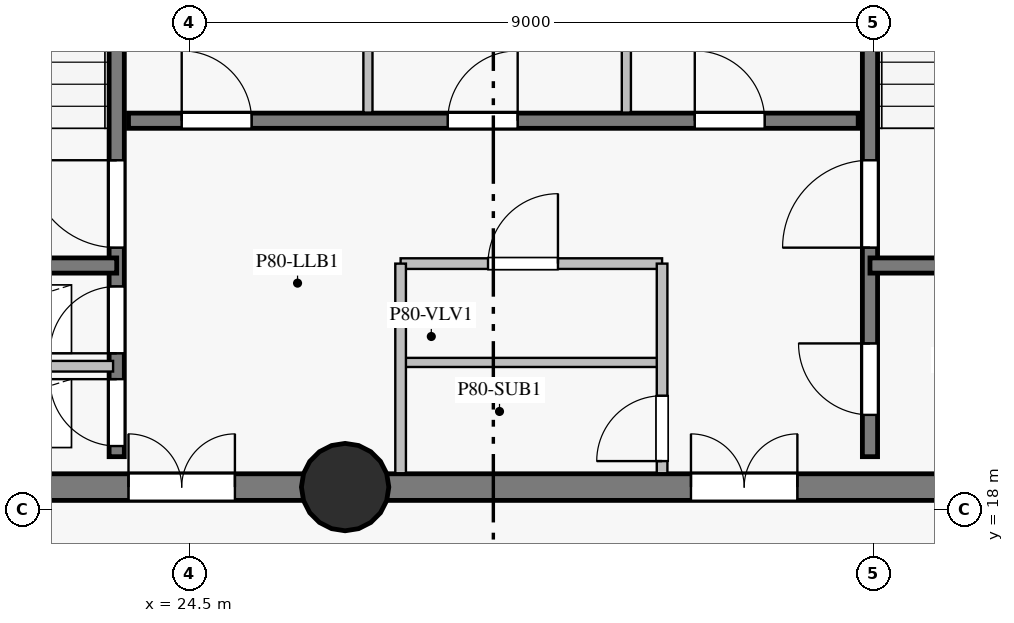
"""IFC4 building model, lengths in metres.
Left out: names, types, materials, properties, quantities, classifications, styles, units other than length and angle.
Written with IfcOpenShell. Run it as: python <this file> out.ifc"""

import sys

from ifc_helpers import new_model, si_unit, direction, frame, frame_2d, origin, origin_with_axes, origin_2d, place, context, subcontext, project, spatial, rectangle, circle, extrude, source, transform, mapped, element, fill, save


model = new_model("IFC4")
c1 = context("Model", 3, precision=1e-05, world=origin(), true_north=direction((0.0, 1.0)))
c2 = subcontext(c1, "Body", "Model", "MODEL_VIEW")
j1 = project(units=[si_unit("LENGTHUNIT", "METRE"), si_unit("PLANEANGLEUNIT", "RADIAN")], contexts=[c1])
p1 = place(None, origin())
s1 = spatial("IfcSite", under=j1, at=p1, CompositionType="ELEMENT")
p2 = place(p1, origin())
s2 = spatial("IfcBuilding", under=s1, at=p2, CompositionType="ELEMENT")
p3 = place(p2, frame((0.0, 0.0, 268.75)))
s3 = spatial("IfcBuildingStorey", under=s2, at=p3, CompositionType="ELEMENT", Elevation=268.75)
p4 = place(p3, frame((19.5, 18.3, 0.0), z_axis=(0.0, 0.0, 1.0), x_axis=(1.0, 0.0, 0.0)))
e1 = element("IfcWall", 1, at=p4, inside=s3, PredefinedType="SHEAR", context=c2, shape_type="SweptSolid", body=[
    extrude(rectangle(XDim=7.05, YDim=0.35, at=frame_2d((3.525, 0.0))), origin(), (0.0, 0.0, 1.0), 4.375),
])
p5 = place(p4, frame((4.2, 0.0, 0.0)))
e2 = element("IfcOpeningElement", 2, at=p5, cuts=e1, PredefinedType="OPENING", context=c2, shape_type="SweptSolid", body=[
    extrude(rectangle(XDim=1.4, YDim=2.2, at=frame_2d((0.7, 1.1))), frame((0.0, 0.185, 0.0), z_axis=(0.0, -1.0, 0.0), x_axis=(1.0, 0.0, 0.0)), (0.0, 0.0, 1.0), 0.37),
])
p6 = place(p3, frame((26.55, 18.3, 0.0), z_axis=(0.0, 0.0, 1.0), x_axis=(1.0, 0.0, 0.0)))
e3 = element("IfcWall", 3, at=p6, inside=s3, PredefinedType="SHEAR", context=c2, shape_type="SweptSolid", body=[
    extrude(rectangle(XDim=10.95, YDim=0.35, at=frame_2d((5.475, 0.0))), origin(), (0.0, 0.0, 1.0), 4.375),
])
p7 = place(p6, frame((4.55, 0.0, 0.0)))
e4 = element("IfcOpeningElement", 4, at=p7, cuts=e3, PredefinedType="OPENING", context=c2, shape_type="SweptSolid", body=[
    extrude(rectangle(XDim=1.4, YDim=2.2, at=frame_2d((0.7, 1.1))), frame((0.0, 0.185, 0.0), z_axis=(0.0, -1.0, 0.0), x_axis=(1.0, 0.0, 0.0)), (0.0, 0.0, 1.0), 0.37),
])
m1 = source(origin_with_axes(), c2, "Body", "SweptSolid", [
    extrude(circle(Radius=0.575, at=origin_2d()), origin(), (0.0, 0.0, 1.0), 4.65),
])
p8 = place(p3, frame((26.55, 18.3, 0.0), z_axis=(0.0, 0.0, 1.0), x_axis=(1.0, 0.0, 0.0)))
e5 = element("IfcColumn", 5, at=p8, inside=s3, PredefinedType="COLUMN", context=c2, shape_type="MappedRepresentation", body=[
    mapped(m1, transform((0.0, 0.0, 0.0), scale=1.0)),
])
p9 = place(p3, frame((23.545, 18.7, 0.0), z_axis=(0.0, 0.0, 1.0), x_axis=(0.0, 1.0, 0.0)))
e6 = element("IfcWall", 6, at=p9, inside=s3, PredefinedType="SHEAR", context=c2, shape_type="SweptSolid", body=[
    extrude(rectangle(XDim=15.6, YDim=0.2, at=frame_2d((7.8, 0.0))), origin(), (0.0, 0.0, 1.0), 4.375),
])
p10 = place(p9, frame((2.75, 0.0, 0.0)))
e7 = element("IfcOpeningElement", 7, at=p10, cuts=e6, PredefinedType="OPENING", context=c2, shape_type="SweptSolid", body=[
    extrude(rectangle(XDim=1.15, YDim=2.15, at=frame_2d((0.575, 1.075))), frame((0.0, 0.11, 0.0), z_axis=(0.0, -1.0, 0.0), x_axis=(1.0, 0.0, 0.0)), (0.0, 0.0, 1.0), 0.22),
])
p11 = place(p9, frame((0.14, 0.0, 0.0)))
e8 = element("IfcOpeningElement", 8, at=p11, cuts=e6, PredefinedType="OPENING", context=c2, shape_type="SweptSolid", body=[
    extrude(rectangle(XDim=0.88, YDim=2.1, at=frame_2d((0.44, 1.05))), frame((0.0, 0.11, 0.0), z_axis=(0.0, -1.0, 0.0), x_axis=(1.0, 0.0, 0.0)), (0.0, 0.0, 1.0), 0.22),
])
p12 = place(p9, frame((1.36, 0.0, 0.0)))
e9 = element("IfcOpeningElement", 9, at=p12, cuts=e6, PredefinedType="OPENING", context=c2, shape_type="SweptSolid", body=[
    extrude(rectangle(XDim=0.88, YDim=2.1, at=frame_2d((0.44, 1.05))), frame((0.0, 0.11, 0.0), z_axis=(0.0, -1.0, 0.0), x_axis=(1.0, 0.0, 0.0)), (0.0, 0.0, 1.0), 0.22),
])
p13 = place(p9, frame((12.1, 0.0, 0.0)))
e10 = element("IfcOpeningElement", 10, at=p13, cuts=e6, PredefinedType="OPENING", context=c2, shape_type="SweptSolid", body=[
    extrude(rectangle(XDim=1.12, YDim=2.15, at=frame_2d((0.56, 1.075))), frame((0.0, 0.11, 0.0), z_axis=(0.0, -1.0, 0.0), x_axis=(1.0, 0.0, 0.0)), (0.0, 0.0, 1.0), 0.22),
])
p14 = place(p9, frame((14.05, 0.0, 0.0)))
e11 = element("IfcOpeningElement", 11, at=p14, cuts=e6, PredefinedType="OPENING", context=c2, shape_type="SweptSolid", body=[
    extrude(rectangle(XDim=1.12, YDim=2.15, at=frame_2d((0.56, 1.075))), frame((0.0, 0.11, 0.0), z_axis=(0.0, -1.0, 0.0), x_axis=(1.0, 0.0, 0.0)), (0.0, 0.0, 1.0), 0.22),
])
p15 = place(p3, frame((33.455, 18.7, 0.0), z_axis=(0.0, 0.0, 1.0), x_axis=(0.0, 1.0, 0.0)))
e12 = element("IfcWall", 12, at=p15, inside=s3, PredefinedType="SHEAR", context=c2, shape_type="SweptSolid", body=[
    extrude(rectangle(XDim=15.6, YDim=0.2, at=frame_2d((7.8, 0.0))), origin(), (0.0, 0.0, 1.0), 4.375),
])
p16 = place(p15, frame((2.75, 0.0, 0.0)))
e13 = element("IfcOpeningElement", 13, at=p16, cuts=e12, PredefinedType="OPENING", context=c2, shape_type="SweptSolid", body=[
    extrude(rectangle(XDim=1.15, YDim=2.15, at=frame_2d((0.575, 1.075))), frame((0.0, 0.11, 0.0), z_axis=(0.0, -1.0, 0.0), x_axis=(1.0, 0.0, 0.0)), (0.0, 0.0, 1.0), 0.22),
])
p17 = place(p15, frame((0.55, 0.0, 0.0)))
e14 = element("IfcOpeningElement", 14, at=p17, cuts=e12, PredefinedType="OPENING", context=c2, shape_type="SweptSolid", body=[
    extrude(rectangle(XDim=0.94, YDim=2.1, at=frame_2d((0.47, 1.05))), frame((0.0, 0.11, 0.0), z_axis=(0.0, -1.0, 0.0), x_axis=(1.0, 0.0, 0.0)), (0.0, 0.0, 1.0), 0.22),
])
p18 = place(p3, frame((23.7, 23.12, 0.0), z_axis=(0.0, 0.0, 1.0), x_axis=(1.0, 0.0, 0.0)))
e15 = element("IfcWall", 15, at=p18, inside=s3, PredefinedType="SHEAR", context=c2, shape_type="SweptSolid", body=[
    extrude(rectangle(XDim=9.6, YDim=0.2, at=frame_2d((4.8, 0.0))), origin(), (0.0, 0.0, 1.0), 4.375),
])
p19 = place(p18, frame((0.7, 0.0, 0.0)))
e16 = element("IfcOpeningElement", 16, at=p19, cuts=e15, PredefinedType="OPENING", context=c2, shape_type="SweptSolid", body=[
    extrude(rectangle(XDim=0.92, YDim=2.1, at=frame_2d((0.46, 1.05))), frame((0.0, 0.11, 0.0), z_axis=(0.0, -1.0, 0.0), x_axis=(1.0, 0.0, 0.0)), (0.0, 0.0, 1.0), 0.22),
])
p20 = place(p18, frame((4.2, 0.0, 0.0)))
e17 = element("IfcOpeningElement", 17, at=p20, cuts=e15, PredefinedType="OPENING", context=c2, shape_type="SweptSolid", body=[
    extrude(rectangle(XDim=0.92, YDim=2.1, at=frame_2d((0.46, 1.05))), frame((0.0, 0.11, 0.0), z_axis=(0.0, -1.0, 0.0), x_axis=(1.0, 0.0, 0.0)), (0.0, 0.0, 1.0), 0.22),
])
p21 = place(p18, frame((7.45, 0.0, 0.0)))
e18 = element("IfcOpeningElement", 18, at=p21, cuts=e15, PredefinedType="OPENING", context=c2, shape_type="SweptSolid", body=[
    extrude(rectangle(XDim=0.92, YDim=2.1, at=frame_2d((0.46, 1.05))), frame((0.0, 0.11, 0.0), z_axis=(0.0, -1.0, 0.0), x_axis=(1.0, 0.0, 0.0)), (0.0, 0.0, 1.0), 0.22),
])
for number, where, z_axis, x_axis in (
    (19, (33.455, 21.215, 0.0), (0.0, 0.0, 1.0), (1.0, 0.0, 0.0)),
    (20, (19.55, 21.215, 0.0), (0.0, 0.0, 1.0), (1.0, 0.0, 0.0)),
):
    element("IfcWall", number, at=place(p3, frame(where, z_axis=z_axis, x_axis=x_axis)), inside=s3, PredefinedType="SHEAR", context=c2, shape_type="SweptSolid", body=[
        extrude(rectangle(XDim=3.995, YDim=0.2, at=frame_2d((1.998, 0.0))), origin(), (0.0, 0.0, 1.0), 4.375),
    ])
p22 = place(p3, frame((19.682, 19.89, 0.0), z_axis=(0.0, 0.0, 1.0), x_axis=(1.0, 0.0, 0.0)))
e21 = element("IfcWall", 21, at=p22, inside=s3, PredefinedType="PARTITIONING", context=c2, shape_type="SweptSolid", body=[
    extrude(rectangle(XDim=3.815, YDim=0.14, at=frame_2d((1.908, 0.0))), origin(), (0.0, 0.0, 1.0), 4.375),
])
p23 = place(p3, frame((27.28, 21.24, 0.0), z_axis=(0.0, 0.0, 1.0), x_axis=(1.0, 0.0, 0.0)))
e22 = element("IfcWall", 22, at=p23, inside=s3, PredefinedType="PARTITIONING", context=c2, shape_type="SweptSolid", body=[
    extrude(rectangle(XDim=3.44, YDim=0.14, at=frame_2d((1.72, 0.0))), origin(), (0.0, 0.0, 1.0), 4.375),
])
p24 = place(p23, frame((1.15, 0.0, 0.0)))
e23 = element("IfcOpeningElement", 23, at=p24, cuts=e22, PredefinedType="OPENING", context=c2, shape_type="SweptSolid", body=[
    extrude(rectangle(XDim=0.92, YDim=2.1, at=frame_2d((0.46, 1.05))), frame((0.0, 0.08, 0.0), z_axis=(0.0, -1.0, 0.0), x_axis=(1.0, 0.0, 0.0)), (0.0, 0.0, 1.0), 0.16),
])
p25 = place(p3, frame((27.28, 19.94, 0.0), z_axis=(0.0, 0.0, 1.0), x_axis=(1.0, 0.0, 0.0)))
e24 = element("IfcWall", 24, at=p25, inside=s3, PredefinedType="PARTITIONING", context=c2, shape_type="SweptSolid", body=[
    extrude(rectangle(XDim=3.44, YDim=0.12, at=frame_2d((1.72, 0.0))), origin(), (0.0, 0.0, 1.0), 4.375),
])
p26 = place(p3, frame((27.28, 18.482, 0.0), z_axis=(0.0, 0.0, 1.0), x_axis=(0.0, 1.0, 0.0)))
e25 = element("IfcWall", 25, at=p26, inside=s3, PredefinedType="PARTITIONING", context=c2, shape_type="SweptSolid", body=[
    extrude(rectangle(XDim=2.758, YDim=0.14, at=frame_2d((1.379, 0.0))), origin(), (0.0, 0.0, 1.0), 4.375),
])
p27 = place(p3, frame((30.72, 18.482, 0.0), z_axis=(0.0, 0.0, 1.0), x_axis=(0.0, 1.0, 0.0)))
e26 = element("IfcWall", 26, at=p27, inside=s3, PredefinedType="PARTITIONING", context=c2, shape_type="SweptSolid", body=[
    extrude(rectangle(XDim=2.758, YDim=0.14, at=frame_2d((1.379, 0.0))), origin(), (0.0, 0.0, 1.0), 4.375),
])
p28 = place(p27, frame((0.16, 0.0, 0.0)))
e27 = element("IfcOpeningElement", 27, at=p28, cuts=e26, PredefinedType="OPENING", context=c2, shape_type="SweptSolid", body=[
    extrude(rectangle(XDim=0.86, YDim=2.1, at=frame_2d((0.43, 1.05))), frame((0.0, 0.08, 0.0), z_axis=(0.0, -1.0, 0.0), x_axis=(1.0, 0.0, 0.0)), (0.0, 0.0, 1.0), 0.16),
])
for number, where, z_axis, x_axis in (
    (28, (26.85, 23.227, 0.0), (0.0, 0.0, 1.0), (0.0, 1.0, 0.0)),
    (29, (30.25, 23.227, 0.0), (0.0, 0.0, 1.0), (0.0, 1.0, 0.0)),
):
    element("IfcWall", number, at=place(p3, frame(where, z_axis=z_axis, x_axis=x_axis)), inside=s3, PredefinedType="PARTITIONING", context=c2, shape_type="SweptSolid", body=[
        extrude(rectangle(XDim=2.587, YDim=0.12, at=frame_2d((1.293, 0.0))), origin(), (0.0, 0.0, 1.0), 4.375),
    ])
m2 = source(origin_with_axes(), c2, "Body", "SweptSolid", [
    extrude(rectangle(XDim=1.15, YDim=2.15, at=frame_2d((0.575, 1.075))), frame((0.0, 0.025, 0.0), z_axis=(0.0, -1.0, 0.0), x_axis=(1.0, 0.0, 0.0)), (0.0, 0.0, 1.0), 0.05),
])
p29 = place(p10, origin())
e30 = element("IfcDoor", 30, at=p29, inside=s3, OperationType="SINGLE_SWING_RIGHT", PredefinedType="DOOR", context=c2, shape_type="MappedRepresentation", body=[
    mapped(m2, transform((0.0, 0.0, 0.0), scale=1.0)),
])
fill(e7, e30)
p30 = place(p16, origin())
e31 = element("IfcDoor", 31, at=p30, inside=s3, OperationType="SINGLE_SWING_LEFT", PredefinedType="DOOR", context=c2, shape_type="MappedRepresentation", body=[
    mapped(m2, transform((0.0, 0.0, 0.0), scale=1.0)),
])
fill(e13, e31)
m3 = source(origin_with_axes(), c2, "Body", "SweptSolid", [
    extrude(rectangle(XDim=0.88, YDim=2.1, at=frame_2d((0.44, 1.05))), frame((0.0, 0.025, 0.0), z_axis=(0.0, -1.0, 0.0), x_axis=(1.0, 0.0, 0.0)), (0.0, 0.0, 1.0), 0.05),
])
p31 = place(p11, origin())
e32 = element("IfcDoor", 32, at=p31, inside=s3, OperationType="SINGLE_SWING_RIGHT", PredefinedType="DOOR", context=c2, shape_type="MappedRepresentation", body=[
    mapped(m3, transform((0.0, 0.0, 0.0), scale=1.0)),
])
fill(e8, e32)
p32 = place(p12, origin())
e33 = element("IfcDoor", 33, at=p32, inside=s3, OperationType="SINGLE_SWING_LEFT", PredefinedType="DOOR", context=c2, shape_type="MappedRepresentation", body=[
    mapped(m3, transform((0.0, 0.0, 0.0), scale=1.0)),
])
fill(e9, e33)
m4 = source(origin_with_axes(), c2, "Body", "SweptSolid", [
    extrude(rectangle(XDim=1.4, YDim=2.2, at=frame_2d((0.7, 1.1))), frame((0.0, 0.025, 0.0), z_axis=(0.0, -1.0, 0.0), x_axis=(1.0, 0.0, 0.0)), (0.0, 0.0, 1.0), 0.05),
])
p33 = place(p5, origin())
e34 = element("IfcDoor", 34, at=p33, inside=s3, OperationType="DOUBLE_DOOR_SINGLE_SWING", PredefinedType="DOOR", context=c2, shape_type="MappedRepresentation", body=[
    mapped(m4, transform((0.0, 0.0, 0.0), scale=1.0)),
])
fill(e2, e34)
p34 = place(p7, origin())
e35 = element("IfcDoor", 35, at=p34, inside=s3, OperationType="DOUBLE_DOOR_SINGLE_SWING", PredefinedType="DOOR", context=c2, shape_type="MappedRepresentation", body=[
    mapped(m4, transform((0.0, 0.0, 0.0), scale=1.0)),
])
fill(e4, e35)
m5 = source(origin_with_axes(), c2, "Body", "SweptSolid", [
    extrude(rectangle(XDim=0.94, YDim=2.1, at=frame_2d((0.47, 1.05))), frame((0.0, 0.025, 0.0), z_axis=(0.0, -1.0, 0.0), x_axis=(1.0, 0.0, 0.0)), (0.0, 0.0, 1.0), 0.05),
])
p35 = place(p17, origin())
e36 = element("IfcDoor", 36, at=p35, inside=s3, OperationType="SINGLE_SWING_RIGHT", PredefinedType="DOOR", context=c2, shape_type="MappedRepresentation", body=[
    mapped(m5, transform((0.0, 0.0, 0.0), scale=1.0)),
])
fill(e14, e36)
m6 = source(origin_with_axes(), c2, "Body", "SweptSolid", [
    extrude(rectangle(XDim=0.86, YDim=2.1, at=frame_2d((0.43, 1.05))), frame((0.0, 0.025, 0.0), z_axis=(0.0, -1.0, 0.0), x_axis=(1.0, 0.0, 0.0)), (0.0, 0.0, 1.0), 0.05),
])
p36 = place(p28, origin())
e37 = element("IfcDoor", 37, at=p36, inside=s3, OperationType="SINGLE_SWING_LEFT", PredefinedType="DOOR", context=c2, shape_type="MappedRepresentation", body=[
    mapped(m6, transform((0.0, 0.0, 0.0), scale=1.0)),
])
fill(e27, e37)
m7 = source(origin_with_axes(), c2, "Body", "SweptSolid", [
    extrude(rectangle(XDim=0.92, YDim=2.1, at=frame_2d((0.46, 1.05))), frame((0.0, 0.025, 0.0), z_axis=(0.0, -1.0, 0.0), x_axis=(1.0, 0.0, 0.0)), (0.0, 0.0, 1.0), 0.05),
])
p37 = place(p24, origin())
e38 = element("IfcDoor", 38, at=p37, inside=s3, OperationType="SINGLE_SWING_RIGHT", PredefinedType="DOOR", context=c2, shape_type="MappedRepresentation", body=[
    mapped(m7, transform((0.0, 0.0, 0.0), scale=1.0)),
])
fill(e23, e38)
p38 = place(p19, origin())
e39 = element("IfcDoor", 39, at=p38, inside=s3, OperationType="SINGLE_SWING_LEFT", PredefinedType="DOOR", context=c2, shape_type="MappedRepresentation", body=[
    mapped(m7, transform((0.0, 0.0, 0.0), scale=1.0)),
])
fill(e16, e39)
p39 = place(p20, origin())
e40 = element("IfcDoor", 40, at=p39, inside=s3, OperationType="SINGLE_SWING_RIGHT", PredefinedType="DOOR", context=c2, shape_type="MappedRepresentation", body=[
    mapped(m7, transform((0.0, 0.0, 0.0), scale=1.0)),
])
fill(e17, e40)
p40 = place(p21, origin())
e41 = element("IfcDoor", 41, at=p40, inside=s3, OperationType="SINGLE_SWING_LEFT", PredefinedType="DOOR", context=c2, shape_type="MappedRepresentation", body=[
    mapped(m7, transform((0.0, 0.0, 0.0), scale=1.0)),
])
fill(e18, e41)
save(model, sys.argv[1])
